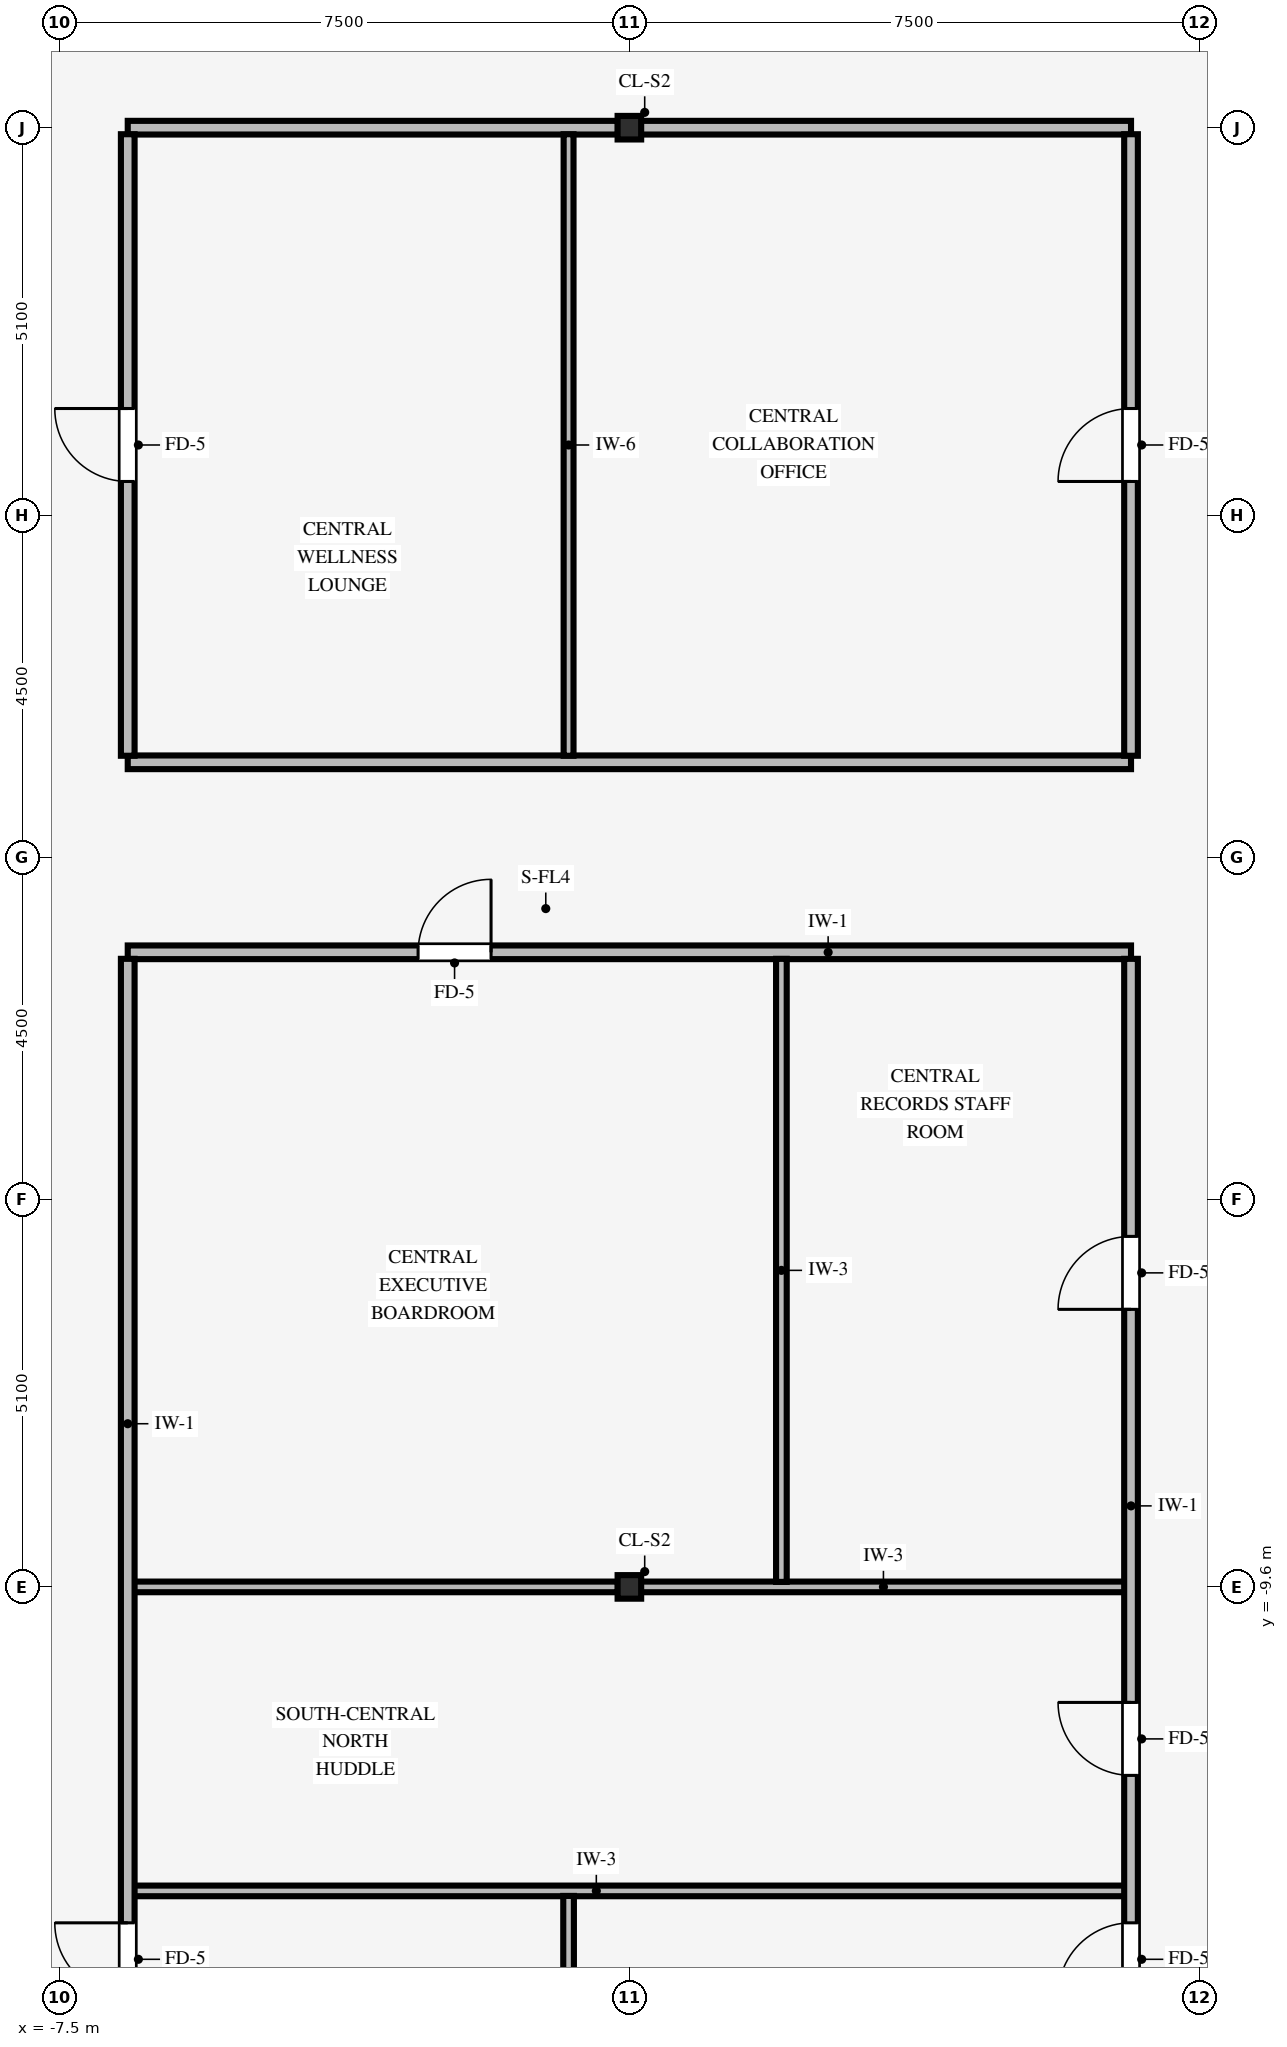
"""IFC4 building model, lengths in metres.
Left out: names, types, materials, properties, quantities, classifications, styles, units other than length and angle.
Written with IfcOpenShell. Run it as: python <this file> out.ifc"""

import sys

from ifc_helpers import new_model, si_unit, direction, frame, frame_2d, origin, origin_2d, place, context, subcontext, project, spatial, rectangle, i_section, extrude, source, transform, mapped, element, fill, save


model = new_model("IFC4")
c1 = context("Model", 3, precision=1e-05, world=origin(), true_north=direction((0.0, 1.0)))
c2 = subcontext(c1, "Body", "Model", "MODEL_VIEW")
j1 = project(units=[si_unit("LENGTHUNIT", "METRE"), si_unit("PLANEANGLEUNIT", "RADIAN")], contexts=[c1])
p1 = place(None, origin())
s1 = spatial("IfcSite", under=j1, at=p1, CompositionType="ELEMENT")
p2 = place(p1, origin())
s2 = spatial("IfcBuilding", under=s1, at=p2, CompositionType="ELEMENT")
p3 = place(p2, frame((0.0, 0.0, 276.2)))
s3 = spatial("IfcBuildingStorey", under=s2, at=p3, CompositionType="ELEMENT", Elevation=276.2)
for number, where, z_axis, x_axis in (
    (1, (0.0, -9.6, 0.0), (0.0, 0.0, 1.0), (1.0, 0.0, 0.0)),
    (2, (0.0, 9.6, 0.0), (0.0, 0.0, 1.0), (1.0, 0.0, 0.0)),
):
    element("IfcColumn", number, at=place(p3, frame(where, z_axis=z_axis, x_axis=x_axis)), inside=s3, PredefinedType="COLUMN", context=c2, shape_type="SweptSolid", body=[
        extrude(i_section(OverallWidth=0.31, OverallDepth=0.31, WebThickness=0.015, FlangeThickness=0.015, FilletRadius=0.015, at=origin_2d()), origin(), (0.0, 0.0, 1.0), 3.37),
    ])
p4 = place(p3, frame((-6.524, -13.6, 0.0), z_axis=(0.0, 0.0, 1.0), x_axis=(1.0, 0.0, 0.0)))
e3 = element("IfcWall", 3, at=p4, inside=s3, PredefinedType="PARTITIONING", context=c2, shape_type="SweptSolid", body=[
    extrude(rectangle(XDim=13.058, YDim=0.14, at=frame_2d((6.529, 0.0))), origin(), (0.0, 0.0, 1.0), 3.038),
])
p5 = place(p3, frame((-6.524, -9.6, 0.0), z_axis=(0.0, 0.0, 1.0), x_axis=(1.0, 0.0, 0.0)))
e4 = element("IfcWall", 4, at=p5, inside=s3, PredefinedType="PARTITIONING", context=c2, shape_type="SweptSolid", body=[
    extrude(rectangle(XDim=6.373, YDim=0.14, at=frame_2d((3.187, 0.0))), origin(), (0.0, 0.0, 1.0), 2.405),
])
p6 = place(p3, frame((0.151, -9.6, 0.0), z_axis=(0.0, 0.0, 1.0), x_axis=(1.0, 0.0, 0.0)))
e5 = element("IfcWall", 5, at=p6, inside=s3, PredefinedType="PARTITIONING", context=c2, shape_type="SweptSolid", body=[
    extrude(rectangle(XDim=6.383, YDim=0.14, at=frame_2d((3.191, 0.0))), origin(), (0.0, 0.0, 1.0), 2.405),
])
p7 = place(p3, frame((-6.6, -1.25, 0.0), z_axis=(0.0, 0.0, 1.0), x_axis=(1.0, 0.0, 0.0)))
e6 = element("IfcWall", 6, at=p7, inside=s3, PredefinedType="PARTITIONING", context=c2, shape_type="SweptSolid", body=[
    extrude(rectangle(XDim=13.2, YDim=0.18, at=frame_2d((6.6, 0.0))), origin(), (0.0, 0.0, 1.0), 3.36),
])
p8 = place(p7, frame((3.82, 0.0, 0.0)))
e7 = element("IfcOpeningElement", 7, at=p8, cuts=e6, PredefinedType="OPENING", context=c2, shape_type="SweptSolid", body=[
    extrude(rectangle(XDim=0.96, YDim=2.1, at=frame_2d((0.48, 1.05))), frame((0.0, 0.1, 0.0), z_axis=(0.0, -1.0, 0.0), x_axis=(1.0, 0.0, 0.0)), (0.0, 0.0, 1.0), 0.2),
])
p9 = place(p3, frame((-6.6, 1.25, 0.0), z_axis=(0.0, 0.0, 1.0), x_axis=(1.0, 0.0, 0.0)))
e8 = element("IfcWall", 8, at=p9, inside=s3, PredefinedType="PARTITIONING", context=c2, shape_type="SweptSolid", body=[
    extrude(rectangle(XDim=13.2, YDim=0.18, at=frame_2d((6.6, 0.0))), origin(), (0.0, 0.0, 1.0), 3.36),
])
for number, where, z_axis, x_axis in (
    (9, (-6.6, 9.6, 0.0), (0.0, 0.0, 1.0), (1.0, 0.0, 0.0)),
    (10, (0.151, 9.6, 0.0), (0.0, 0.0, 1.0), (1.0, 0.0, 0.0)),
):
    element("IfcWall", number, at=place(p3, frame(where, z_axis=z_axis, x_axis=x_axis)), inside=s3, PredefinedType="PARTITIONING", context=c2, shape_type="SweptSolid", body=[
        extrude(rectangle(XDim=6.449, YDim=0.18, at=frame_2d((3.225, 0.0))), origin(), (0.0, 0.0, 1.0), 2.405),
    ])
p10 = place(p3, frame((-6.6, -19.1, 0.0), z_axis=(0.0, 0.0, 1.0), x_axis=(0.0, 1.0, 0.0)))
e11 = element("IfcWall", 11, at=p10, inside=s3, PredefinedType="PARTITIONING", context=c2, shape_type="SweptSolid", body=[
    extrude(rectangle(XDim=17.764, YDim=0.18, at=frame_2d((8.882, 0.0))), origin(), (0.0, 0.0, 1.0), 3.36),
])
p11 = place(p10, frame((4.12, 0.0, 0.0)))
e12 = element("IfcOpeningElement", 12, at=p11, cuts=e11, PredefinedType="OPENING", context=c2, shape_type="SweptSolid", body=[
    extrude(rectangle(XDim=0.96, YDim=2.1, at=frame_2d((0.48, 1.05))), frame((0.0, 0.1, 0.0), z_axis=(0.0, -1.0, 0.0), x_axis=(1.0, 0.0, 0.0)), (0.0, 0.0, 1.0), 0.2),
])
p12 = place(p3, frame((-6.6, 1.336, 0.0), z_axis=(0.0, 0.0, 1.0), x_axis=(0.0, 1.0, 0.0)))
e13 = element("IfcWall", 13, at=p12, inside=s3, PredefinedType="PARTITIONING", context=c2, shape_type="SweptSolid", body=[
    extrude(rectangle(XDim=8.178, YDim=0.18, at=frame_2d((4.089, 0.0))), origin(), (0.0, 0.0, 1.0), 3.36),
])
p13 = place(p12, frame((3.609, 0.0, 0.0)))
e14 = element("IfcOpeningElement", 14, at=p13, cuts=e13, PredefinedType="OPENING", context=c2, shape_type="SweptSolid", body=[
    extrude(rectangle(XDim=0.96, YDim=2.1, at=frame_2d((0.48, 1.05))), frame((0.0, 0.1, 0.0), z_axis=(0.0, -1.0, 0.0), x_axis=(1.0, 0.0, 0.0)), (0.0, 0.0, 1.0), 0.2),
])
p14 = place(p3, frame((-0.8, -19.1, 0.0), z_axis=(0.0, 0.0, 1.0), x_axis=(0.0, 1.0, 0.0)))
e15 = element("IfcWall", 15, at=p14, inside=s3, PredefinedType="PARTITIONING", context=c2, shape_type="SweptSolid", body=[
    extrude(rectangle(XDim=5.434, YDim=0.14, at=frame_2d((2.717, 0.0))), origin(), (0.0, 0.0, 1.0), 3.36),
])
p15 = place(p3, frame((-0.8, 1.336, 0.0), z_axis=(0.0, 0.0, 1.0), x_axis=(0.0, 1.0, 0.0)))
e16 = element("IfcWall", 16, at=p15, inside=s3, PredefinedType="PARTITIONING", context=c2, shape_type="SweptSolid", body=[
    extrude(rectangle(XDim=8.178, YDim=0.13, at=frame_2d((4.089, 0.0))), origin(), (0.0, 0.0, 1.0), 3.36),
])
p16 = place(p3, frame((2.0, -9.534, 0.0), z_axis=(0.0, 0.0, 1.0), x_axis=(0.0, 1.0, 0.0)))
e17 = element("IfcWall", 17, at=p16, inside=s3, PredefinedType="PARTITIONING", context=c2, shape_type="SweptSolid", body=[
    extrude(rectangle(XDim=8.198, YDim=0.14, at=frame_2d((4.099, 0.0))), origin(), (0.0, 0.0, 1.0), 3.36),
])
p17 = place(p3, frame((6.6, -19.1, 0.0), z_axis=(0.0, 0.0, 1.0), x_axis=(0.0, 1.0, 0.0)))
e18 = element("IfcWall", 18, at=p17, inside=s3, PredefinedType="PARTITIONING", context=c2, shape_type="SweptSolid", body=[
    extrude(rectangle(XDim=17.764, YDim=0.18, at=frame_2d((8.882, 0.0))), origin(), (0.0, 0.0, 1.0), 3.36),
])
p18 = place(p17, frame((13.152, 0.0, 0.0)))
e19 = element("IfcOpeningElement", 19, at=p18, cuts=e18, PredefinedType="OPENING", context=c2, shape_type="SweptSolid", body=[
    extrude(rectangle(XDim=0.96, YDim=2.1, at=frame_2d((0.48, 1.05))), frame((0.0, 0.1, 0.0), z_axis=(0.0, -1.0, 0.0), x_axis=(1.0, 0.0, 0.0)), (0.0, 0.0, 1.0), 0.2),
])
p19 = place(p17, frame((7.02, 0.0, 0.0)))
e20 = element("IfcOpeningElement", 20, at=p19, cuts=e18, PredefinedType="OPENING", context=c2, shape_type="SweptSolid", body=[
    extrude(rectangle(XDim=0.96, YDim=2.1, at=frame_2d((0.48, 1.05))), frame((0.0, 0.1, 0.0), z_axis=(0.0, -1.0, 0.0), x_axis=(1.0, 0.0, 0.0)), (0.0, 0.0, 1.0), 0.2),
])
p20 = place(p17, frame((4.12, 0.0, 0.0)))
e21 = element("IfcOpeningElement", 21, at=p20, cuts=e18, PredefinedType="OPENING", context=c2, shape_type="SweptSolid", body=[
    extrude(rectangle(XDim=0.96, YDim=2.1, at=frame_2d((0.48, 1.05))), frame((0.0, 0.1, 0.0), z_axis=(0.0, -1.0, 0.0), x_axis=(1.0, 0.0, 0.0)), (0.0, 0.0, 1.0), 0.2),
])
p21 = place(p3, frame((6.6, 1.336, 0.0), z_axis=(0.0, 0.0, 1.0), x_axis=(0.0, 1.0, 0.0)))
e22 = element("IfcWall", 22, at=p21, inside=s3, PredefinedType="PARTITIONING", context=c2, shape_type="SweptSolid", body=[
    extrude(rectangle(XDim=8.178, YDim=0.18, at=frame_2d((4.089, 0.0))), origin(), (0.0, 0.0, 1.0), 3.36),
])
p22 = place(p21, frame((3.609, 0.0, 0.0)))
e23 = element("IfcOpeningElement", 23, at=p22, cuts=e22, PredefinedType="OPENING", context=c2, shape_type="SweptSolid", body=[
    extrude(rectangle(XDim=0.96, YDim=2.1, at=frame_2d((0.48, 1.05))), frame((0.0, 0.1, 0.0), z_axis=(0.0, -1.0, 0.0), x_axis=(1.0, 0.0, 0.0)), (0.0, 0.0, 1.0), 0.2),
])
m1 = source(origin(), c2, "Body", "SweptSolid", [
    extrude(rectangle(XDim=0.96, YDim=2.1, at=frame_2d((0.48, 1.05))), frame((0.0, 0.025, 0.0), z_axis=(0.0, -1.0, 0.0), x_axis=(1.0, 0.0, 0.0)), (0.0, 0.0, 1.0), 0.05),
])
p23 = place(p8, origin())
e24 = element("IfcDoor", 24, at=p23, inside=s3, OperationType="SINGLE_SWING_RIGHT", PredefinedType="DOOR", context=c2, shape_type="MappedRepresentation", body=[
    mapped(m1, transform((0.0, 0.0, 0.0), scale=1.0)),
])
fill(e7, e24)
p24 = place(p18, origin())
e25 = element("IfcDoor", 25, at=p24, inside=s3, OperationType="SINGLE_SWING_LEFT", PredefinedType="DOOR", context=c2, shape_type="MappedRepresentation", body=[
    mapped(m1, transform((0.0, 0.0, 0.0), scale=1.0)),
])
fill(e19, e25)
p25 = place(p13, origin())
e26 = element("IfcDoor", 26, at=p25, inside=s3, OperationType="SINGLE_SWING_RIGHT", PredefinedType="DOOR", context=c2, shape_type="MappedRepresentation", body=[
    mapped(m1, transform((0.0, 0.0, 0.0), scale=1.0)),
])
fill(e14, e26)
p26 = place(p22, origin())
e27 = element("IfcDoor", 27, at=p26, inside=s3, OperationType="SINGLE_SWING_LEFT", PredefinedType="DOOR", context=c2, shape_type="MappedRepresentation", body=[
    mapped(m1, transform((0.0, 0.0, 0.0), scale=1.0)),
])
fill(e23, e27)
p27 = place(p19, origin())
e28 = element("IfcDoor", 28, at=p27, inside=s3, OperationType="SINGLE_SWING_RIGHT", PredefinedType="DOOR", context=c2, shape_type="MappedRepresentation", body=[
    mapped(m1, transform((0.0, 0.0, 0.0), scale=1.0)),
])
fill(e20, e28)
p28 = place(p11, origin())
e29 = element("IfcDoor", 29, at=p28, inside=s3, OperationType="SINGLE_SWING_RIGHT", PredefinedType="DOOR", context=c2, shape_type="MappedRepresentation", body=[
    mapped(m1, transform((0.0, 0.0, 0.0), scale=1.0)),
])
fill(e12, e29)
p29 = place(p20, origin())
e30 = element("IfcDoor", 30, at=p29, inside=s3, OperationType="SINGLE_SWING_LEFT", PredefinedType="DOOR", context=c2, shape_type="MappedRepresentation", body=[
    mapped(m1, transform((0.0, 0.0, 0.0), scale=1.0)),
])
fill(e21, e30)
save(model, sys.argv[1])
